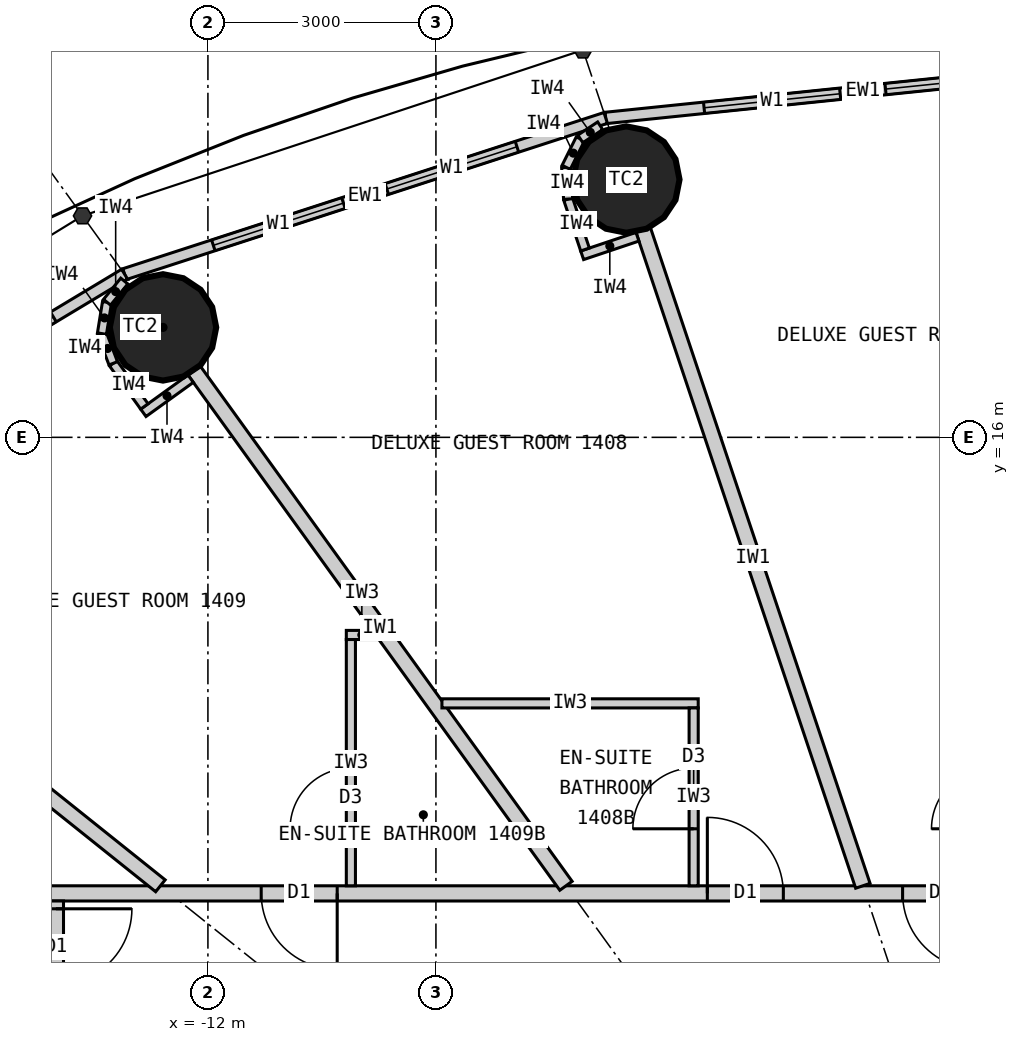
"""IFC4 building model, lengths in metres.
Left out: names, types, materials, properties, quantities, classifications, styles, units other than length and angle.
Written with IfcOpenShell. Run it as: python <this file> out.ifc"""

import sys

from ifc_helpers import new_model, si_unit, direction, frame, frame_2d, origin, origin_2d, place, context, subcontext, project, spatial, rectangle, circle, extrude, element, fill, save


model = new_model("IFC4")
c1 = context("Model", 3, precision=1e-05, world=origin(), true_north=direction((0.0, 1.0)))
c2 = subcontext(c1, "Body", "Model", "MODEL_VIEW")
j1 = project(units=[si_unit("LENGTHUNIT", "METRE"), si_unit("PLANEANGLEUNIT", "RADIAN")], contexts=[c1])
p1 = place(None, origin())
s1 = spatial("IfcSite", under=j1, at=p1, CompositionType="ELEMENT")
p2 = place(p1, origin())
s2 = spatial("IfcBuilding", under=s1, at=p2, CompositionType="ELEMENT")
p3 = place(p2, frame((0.0, 0.0, 60.6)))
s3 = spatial("IfcBuildingStorey", under=s2, at=p3, CompositionType="ELEMENT", Elevation=60.6)
for number, where, z_axis, x_axis in (
    (1, (-6.495, 19.391, 0.0), (0.0, 0.0, 1.0), (1.0, 0.0, 0.0)),
    (2, (-12.591, 17.447, 0.0), (0.0, 0.0, 1.0), (1.0, 0.0, 0.0)),
):
    element("IfcColumn", number, at=place(p3, frame(where, z_axis=z_axis, x_axis=x_axis)), inside=s3, PredefinedType="COLUMN", context=c2, shape_type="SweptSolid", body=[
        extrude(circle(Radius=0.7, at=origin_2d()), origin(), (0.0, 0.0, 1.0), 3.3),
    ])
p4 = place(p3, frame((0.0, 20.9, 0.0), z_axis=(0.0, 0.0, 1.0), x_axis=(-0.994721394369, -0.102612609291, 0.0)))
e3 = element("IfcWall", 3, at=p4, inside=s3, PredefinedType="ELEMENTEDWALL", context=c2, shape_type="SweptSolid", body=[
    extrude(rectangle(XDim=6.802, YDim=0.15, at=frame_2d((3.401, 0.0))), origin(), (0.0, 0.0, 1.0), 3.12),
])
p5 = place(p4, frame((1.301, 0.0, 0.9)))
e4 = element("IfcOpeningElement", 4, at=p5, cuts=e3, PredefinedType="OPENING", context=c2, shape_type="SweptSolid", body=[
    extrude(rectangle(XDim=1.8, YDim=1.9, at=frame_2d((0.9, 0.95))), frame((0.0, 0.085, 0.0), z_axis=(0.0, -1.0, 0.0), x_axis=(1.0, 0.0, 0.0)), (0.0, 0.0, 1.0), 0.17),
])
p6 = place(p4, frame((3.701, 0.0, 0.9)))
e5 = element("IfcOpeningElement", 5, at=p6, cuts=e3, PredefinedType="OPENING", context=c2, shape_type="SweptSolid", body=[
    extrude(rectangle(XDim=1.8, YDim=1.9, at=frame_2d((0.9, 0.95))), frame((0.0, 0.085, 0.0), z_axis=(0.0, -1.0, 0.0), x_axis=(1.0, 0.0, 0.0)), (0.0, 0.0, 1.0), 0.17),
])
p7 = place(p3, frame((-6.766, 20.202, 0.0), z_axis=(0.0, 0.0, 1.0), x_axis=(-0.951137534625, -0.308767534285, 0.0)))
e6 = element("IfcWall", 6, at=p7, inside=s3, PredefinedType="ELEMENTEDWALL", context=c2, shape_type="SweptSolid", body=[
    extrude(rectangle(XDim=6.655, YDim=0.15, at=frame_2d((3.328, 0.0))), origin(), (0.0, 0.0, 1.0), 3.12),
])
p8 = place(p7, frame((1.228, 0.0, 0.9)))
e7 = element("IfcOpeningElement", 7, at=p8, cuts=e6, PredefinedType="OPENING", context=c2, shape_type="SweptSolid", body=[
    extrude(rectangle(XDim=1.8, YDim=1.9, at=frame_2d((0.9, 0.95))), frame((0.0, 0.085, 0.0), z_axis=(0.0, -1.0, 0.0), x_axis=(1.0, 0.0, 0.0)), (0.0, 0.0, 1.0), 0.17),
])
p9 = place(p7, frame((3.628, 0.0, 0.9)))
e8 = element("IfcOpeningElement", 8, at=p9, cuts=e6, PredefinedType="OPENING", context=c2, shape_type="SweptSolid", body=[
    extrude(rectangle(XDim=1.8, YDim=1.9, at=frame_2d((0.9, 0.95))), frame((0.0, 0.085, 0.0), z_axis=(0.0, -1.0, 0.0), x_axis=(1.0, 0.0, 0.0)), (0.0, 0.0, 1.0), 0.17),
])
p10 = place(p3, frame((-13.096, 18.147, 0.0), z_axis=(0.0, 0.0, 1.0), x_axis=(-0.856983180864, -0.515344377787, 0.0)))
e9 = element("IfcWall", 9, at=p10, inside=s3, PredefinedType="ELEMENTEDWALL", context=c2, shape_type="SweptSolid", body=[
    extrude(rectangle(XDim=6.386, YDim=0.15, at=frame_2d((3.193, 0.0))), origin(), (0.0, 0.0, 1.0), 3.12),
])
p11 = place(p10, frame((1.093, 0.0, 0.9)))
e10 = element("IfcOpeningElement", 10, at=p11, cuts=e9, PredefinedType="OPENING", context=c2, shape_type="SweptSolid", body=[
    extrude(rectangle(XDim=1.8, YDim=1.9, at=frame_2d((0.9, 0.95))), frame((0.0, 0.085, 0.0), z_axis=(0.0, -1.0, 0.0), x_axis=(1.0, 0.0, 0.0)), (0.0, 0.0, 1.0), 0.17),
])
p12 = place(p10, frame((3.493, 0.0, 0.9)))
e11 = element("IfcOpeningElement", 11, at=p12, cuts=e9, PredefinedType="OPENING", context=c2, shape_type="SweptSolid", body=[
    extrude(rectangle(XDim=1.8, YDim=1.9, at=frame_2d((0.9, 0.95))), frame((0.0, 0.085, 0.0), z_axis=(0.0, -1.0, 0.0), x_axis=(1.0, 0.0, 0.0)), (0.0, 0.0, 1.0), 0.17),
])
p13 = place(p3, frame((-14.1, 10.0, 0.0), z_axis=(0.0, 0.0, 1.0), x_axis=(1.0, 0.0, 0.0)))
e12 = element("IfcWall", 12, at=p13, inside=s3, PredefinedType="PARTITIONING", context=c2, shape_type="SweptSolid", body=[
    extrude(rectangle(XDim=28.2, YDim=0.2, at=frame_2d((14.1, 0.0))), origin(), (0.0, 0.0, 1.0), 3.12),
])
p14 = place(p13, frame((18.529, 0.0, 0.0)))
e13 = element("IfcOpeningElement", 13, at=p14, cuts=e12, PredefinedType="OPENING", context=c2, shape_type="SweptSolid", body=[
    extrude(rectangle(XDim=1.0, YDim=2.2, at=frame_2d((0.5, 1.1))), frame((0.0, 0.11, 0.0), z_axis=(0.0, -1.0, 0.0), x_axis=(1.0, 0.0, 0.0)), (0.0, 0.0, 1.0), 0.22),
])
p15 = place(p13, frame((14.623, 0.0, 0.0)))
e14 = element("IfcOpeningElement", 14, at=p15, cuts=e12, PredefinedType="OPENING", context=c2, shape_type="SweptSolid", body=[
    extrude(rectangle(XDim=1.0, YDim=2.2, at=frame_2d((0.5, 1.1))), frame((0.0, 0.11, 0.0), z_axis=(0.0, -1.0, 0.0), x_axis=(1.0, 0.0, 0.0)), (0.0, 0.0, 1.0), 0.22),
])
p16 = place(p13, frame((11.24, 0.0, 0.0)))
e15 = element("IfcOpeningElement", 15, at=p16, cuts=e12, PredefinedType="OPENING", context=c2, shape_type="SweptSolid", body=[
    extrude(rectangle(XDim=1.0, YDim=2.2, at=frame_2d((0.5, 1.1))), frame((0.0, 0.11, 0.0), z_axis=(0.0, -1.0, 0.0), x_axis=(1.0, 0.0, 0.0)), (0.0, 0.0, 1.0), 0.22),
])
p17 = place(p13, frame((8.671, 0.0, 0.0)))
e16 = element("IfcOpeningElement", 16, at=p17, cuts=e12, PredefinedType="OPENING", context=c2, shape_type="SweptSolid", body=[
    extrude(rectangle(XDim=1.0, YDim=2.2, at=frame_2d((0.5, 1.1))), frame((0.0, 0.11, 0.0), z_axis=(0.0, -1.0, 0.0), x_axis=(1.0, 0.0, 0.0)), (0.0, 0.0, 1.0), 0.22),
])
p18 = place(p13, frame((2.801, 0.0, 0.0)))
e17 = element("IfcOpeningElement", 17, at=p18, cuts=e12, PredefinedType="OPENING", context=c2, shape_type="SweptSolid", body=[
    extrude(rectangle(XDim=1.0, YDim=2.2, at=frame_2d((0.5, 1.1))), frame((0.0, 0.11, 0.0), z_axis=(0.0, -1.0, 0.0), x_axis=(1.0, 0.0, 0.0)), (0.0, 0.0, 1.0), 0.22),
])
p19 = place(p3, frame((-14.0, 9.9, 0.0), z_axis=(0.0, 0.0, 1.0), x_axis=(0.0, -1.0, 0.0)))
e18 = element("IfcWall", 18, at=p19, inside=s3, PredefinedType="PARTITIONING", context=c2, shape_type="SweptSolid", body=[
    extrude(rectangle(XDim=19.8, YDim=0.2, at=frame_2d((9.9, 0.0))), origin(), (0.0, 0.0, 1.0), 3.12),
])
p20 = place(p19, frame((0.103, 0.0, 0.0)))
e19 = element("IfcOpeningElement", 19, at=p20, cuts=e18, PredefinedType="OPENING", context=c2, shape_type="SweptSolid", body=[
    extrude(rectangle(XDim=1.0, YDim=2.2, at=frame_2d((0.5, 1.1))), frame((0.0, 0.11, 0.0), z_axis=(0.0, -1.0, 0.0), x_axis=(1.0, 0.0, 0.0)), (0.0, 0.0, 1.0), 0.22),
])
p21 = place(p19, frame((5.248, 0.0, 0.0)))
e20 = element("IfcOpeningElement", 20, at=p21, cuts=e18, PredefinedType="OPENING", context=c2, shape_type="SweptSolid", body=[
    extrude(rectangle(XDim=1.0, YDim=2.2, at=frame_2d((0.5, 1.1))), frame((0.0, 0.11, 0.0), z_axis=(0.0, -1.0, 0.0), x_axis=(1.0, 0.0, 0.0)), (0.0, 0.0, 1.0), 0.22),
])
p22 = place(p19, frame((9.438, 0.0, 0.0)))
e21 = element("IfcOpeningElement", 21, at=p22, cuts=e18, PredefinedType="OPENING", context=c2, shape_type="SweptSolid", body=[
    extrude(rectangle(XDim=1.0, YDim=2.2, at=frame_2d((0.5, 1.1))), frame((0.0, 0.11, 0.0), z_axis=(0.0, -1.0, 0.0), x_axis=(1.0, 0.0, 0.0)), (0.0, 0.0, 1.0), 0.22),
])
p23 = place(p19, frame((13.942, 0.0, 0.0)))
e22 = element("IfcOpeningElement", 22, at=p23, cuts=e18, PredefinedType="OPENING", context=c2, shape_type="SweptSolid", body=[
    extrude(rectangle(XDim=1.0, YDim=2.2, at=frame_2d((0.5, 1.1))), frame((0.0, 0.11, 0.0), z_axis=(0.0, -1.0, 0.0), x_axis=(1.0, 0.0, 0.0)), (0.0, 0.0, 1.0), 0.22),
])
p24 = place(p19, frame((18.698, 0.0, 0.0)))
e23 = element("IfcOpeningElement", 23, at=p24, cuts=e18, PredefinedType="OPENING", context=c2, shape_type="SweptSolid", body=[
    extrude(rectangle(XDim=1.0, YDim=2.2, at=frame_2d((0.5, 1.1))), frame((0.0, 0.11, 0.0), z_axis=(0.0, -1.0, 0.0), x_axis=(1.0, 0.0, 0.0)), (0.0, 0.0, 1.0), 0.22),
])
p25 = place(p3, frame((-3.383, 10.1, 0.0), z_axis=(0.0, 0.0, 1.0), x_axis=(-0.31759592231, 0.948226149256, 0.0)))
e24 = element("IfcWall", 24, at=p25, inside=s3, PredefinedType="PARTITIONING", context=c2, shape_type="SweptSolid", body=[
    extrude(rectangle(XDim=9.098, YDim=0.2, at=frame_2d((4.549, 0.0))), origin(), (0.0, 0.0, 1.0), 2.32),
])
p26 = place(p3, frame((-7.289, 10.1, 0.0), z_axis=(0.0, 0.0, 1.0), x_axis=(-0.585198353053, 0.810890182197, 0.0)))
e25 = element("IfcWall", 25, at=p26, inside=s3, PredefinedType="PARTITIONING", context=c2, shape_type="SweptSolid", body=[
    extrude(rectangle(XDim=8.36, YDim=0.2, at=frame_2d((4.18, 0.0))), origin(), (0.0, 0.0, 1.0), 2.32),
])
p27 = place(p3, frame((-12.625, 10.1, 0.0), z_axis=(0.0, 0.0, 1.0), x_axis=(-0.780892451574, 0.624665493744, 0.0)))
e26 = element("IfcWall", 26, at=p27, inside=s3, PredefinedType="PARTITIONING", context=c2, shape_type="SweptSolid", body=[
    extrude(rectangle(XDim=6.045, YDim=0.2, at=frame_2d((3.022, 0.0))), origin(), (0.0, 0.0, 1.0), 2.32),
])
p28 = place(p3, frame((-8.921, 12.5, 0.0), z_axis=(0.0, 0.0, 1.0), x_axis=(1.0, 0.0, 0.0)))
e27 = element("IfcWall", 27, at=p28, inside=s3, PredefinedType="PARTITIONING", context=c2, shape_type="SweptSolid", body=[
    extrude(rectangle(XDim=3.372, YDim=0.12, at=frame_2d((1.686, 0.0))), origin(), (0.0, 0.0, 1.0), 3.12),
])
p29 = place(p3, frame((-5.609, 10.1, 0.0), z_axis=(0.0, 0.0, 1.0), x_axis=(0.0, 1.0, 0.0)))
e28 = element("IfcWall", 28, at=p29, inside=s3, PredefinedType="PARTITIONING", context=c2, shape_type="SweptSolid", body=[
    extrude(rectangle(XDim=2.34, YDim=0.12, at=frame_2d((1.17, 0.0))), origin(), (0.0, 0.0, 1.0), 3.12),
])
p30 = place(p29, frame((0.75, 0.0, 0.0)))
e29 = element("IfcOpeningElement", 29, at=p30, cuts=e28, PredefinedType="OPENING", context=c2, shape_type="SweptSolid", body=[
    extrude(rectangle(XDim=0.8, YDim=2.1, at=frame_2d((0.4, 1.05))), frame((0.0, 0.07, 0.0), z_axis=(0.0, -1.0, 0.0), x_axis=(1.0, 0.0, 0.0)), (0.0, 0.0, 1.0), 0.14),
])
p31 = place(p3, frame((-9.771, 13.4, 0.0), z_axis=(0.0, 0.0, 1.0), x_axis=(-1.0, 0.0, 0.0)))
e30 = element("IfcWall", 30, at=p31, inside=s3, PredefinedType="PARTITIONING", context=c2, shape_type="SweptSolid", body=[
    extrude(rectangle(XDim=0.408, YDim=0.12, at=frame_2d((0.204, 0.0))), origin(), (0.0, 0.0, 1.0), 3.12),
])
p32 = place(p3, frame((-10.119, 10.1, 0.0), z_axis=(0.0, 0.0, 1.0), x_axis=(0.0, 1.0, 0.0)))
e31 = element("IfcWall", 31, at=p32, inside=s3, PredefinedType="PARTITIONING", context=c2, shape_type="SweptSolid", body=[
    extrude(rectangle(XDim=3.24, YDim=0.12, at=frame_2d((1.62, 0.0))), origin(), (0.0, 0.0, 1.0), 3.12),
])
p33 = place(p32, frame((0.75, 0.0, 0.0)))
e32 = element("IfcOpeningElement", 32, at=p33, cuts=e31, PredefinedType="OPENING", context=c2, shape_type="SweptSolid", body=[
    extrude(rectangle(XDim=0.8, YDim=2.1, at=frame_2d((0.4, 1.05))), frame((0.0, 0.07, 0.0), z_axis=(0.0, -1.0, 0.0), x_axis=(1.0, 0.0, 0.0)), (0.0, 0.0, 1.0), 0.14),
])
p34 = place(p3, frame((-6.348, 18.639, 0.0), z_axis=(0.0, 0.0, 1.0), x_axis=(-0.948268951266, -0.317468102437, 0.0)))
e33 = element("IfcWall", 33, at=p34, inside=s3, PredefinedType="PARTITIONING", context=c2, shape_type="SweptSolid", body=[
    extrude(rectangle(XDim=0.768, YDim=0.12, at=frame_2d((0.384, 0.0))), origin(), (0.0, 0.0, 1.0), 3.12),
])
p35 = place(p3, frame((-7.038, 18.471, 0.0), z_axis=(0.0, 0.0, 1.0), x_axis=(-0.317378466199, 0.9482989556, 0.0)))
e34 = element("IfcWall", 34, at=p35, inside=s3, PredefinedType="PARTITIONING", context=c2, shape_type="SweptSolid", body=[
    extrude(rectangle(XDim=0.7, YDim=0.12, at=frame_2d((0.35, 0.0))), origin(), (0.0, 0.0, 1.0), 3.12),
])
p36 = place(p3, frame((-7.26, 19.135, 0.0), z_axis=(0.0, 0.0, 1.0), x_axis=(-0.0613238046, 0.99811792439, 0.0)))
e35 = element("IfcWall", 35, at=p36, inside=s3, PredefinedType="PARTITIONING", context=c2, shape_type="SweptSolid", body=[
    extrude(rectangle(XDim=0.418, YDim=0.12, at=frame_2d((0.209, 0.0))), origin(), (0.0, 0.0, 1.0), 3.12),
])
p37 = place(p3, frame((-7.286, 19.552, 0.0), z_axis=(0.0, 0.0, 1.0), x_axis=(0.445810757773, 0.89512723579, 0.0)))
e36 = element("IfcWall", 36, at=p37, inside=s3, PredefinedType="PARTITIONING", context=c2, shape_type="SweptSolid", body=[
    extrude(rectangle(XDim=0.418, YDim=0.12, at=frame_2d((0.209, 0.0))), origin(), (0.0, 0.0, 1.0), 3.12),
])
p38 = place(p3, frame((-7.1, 19.926, 0.0), z_axis=(0.0, 0.0, 1.0), x_axis=(0.833488262509, 0.552537162787, 0.0)))
e37 = element("IfcWall", 37, at=p38, inside=s3, PredefinedType="PARTITIONING", context=c2, shape_type="SweptSolid", body=[
    extrude(rectangle(XDim=0.313, YDim=0.12, at=frame_2d((0.156, 0.0))), origin(), (0.0, 0.0, 1.0), 3.12),
])
p39 = place(p3, frame((-12.227, 16.772, 0.0), z_axis=(0.0, 0.0, 1.0), x_axis=(-0.810821798253, -0.585293098778, 0.0)))
e38 = element("IfcWall", 38, at=p39, inside=s3, PredefinedType="PARTITIONING", context=c2, shape_type="SweptSolid", body=[
    extrude(rectangle(XDim=0.768, YDim=0.12, at=frame_2d((0.384, 0.0))), origin(), (0.0, 0.0, 1.0), 3.12),
])
p40 = place(p3, frame((-12.836, 16.406, 0.0), z_axis=(0.0, 0.0, 1.0), x_axis=(-0.585223113993, 0.810872312296, 0.0)))
e39 = element("IfcWall", 39, at=p40, inside=s3, PredefinedType="PARTITIONING", context=c2, shape_type="SweptSolid", body=[
    extrude(rectangle(XDim=0.7, YDim=0.12, at=frame_2d((0.35, 0.0))), origin(), (0.0, 0.0, 1.0), 3.12),
])
p41 = place(p3, frame((-13.246, 16.974, 0.0), z_axis=(0.0, 0.0, 1.0), x_axis=(-0.355728122235, 0.934589483705, 0.0)))
e40 = element("IfcWall", 40, at=p41, inside=s3, PredefinedType="PARTITIONING", context=c2, shape_type="SweptSolid", body=[
    extrude(rectangle(XDim=0.418, YDim=0.12, at=frame_2d((0.209, 0.0))), origin(), (0.0, 0.0, 1.0), 3.12),
])
p42 = place(p3, frame((-13.394, 17.365, 0.0), z_axis=(0.0, 0.0, 1.0), x_axis=(0.159379276926, 0.987217425943, 0.0)))
e41 = element("IfcWall", 41, at=p42, inside=s3, PredefinedType="PARTITIONING", context=c2, shape_type="SweptSolid", body=[
    extrude(rectangle(XDim=0.418, YDim=0.12, at=frame_2d((0.209, 0.0))), origin(), (0.0, 0.0, 1.0), 3.12),
])
p43 = place(p3, frame((-13.328, 17.777, 0.0), z_axis=(0.0, 0.0, 1.0), x_axis=(0.632276783541, 0.774742582407, 0.0)))
e42 = element("IfcWall", 42, at=p43, inside=s3, PredefinedType="PARTITIONING", context=c2, shape_type="SweptSolid", body=[
    extrude(rectangle(XDim=0.36, YDim=0.12, at=frame_2d((0.18, 0.0))), origin(), (0.0, 0.0, 1.0), 3.12),
])
p44 = place(p5, origin())
e43 = element("IfcWindow", 43, at=p44, inside=s3, PartitioningType="SINGLE_PANEL", PredefinedType="WINDOW", context=c2, shape_type="SweptSolid", body=[
    extrude(rectangle(XDim=1.8, YDim=1.9, at=frame_2d((0.9, 0.95))), frame((0.0, 0.03, 0.0), z_axis=(0.0, -1.0, 0.0), x_axis=(1.0, 0.0, 0.0)), (0.0, 0.0, 1.0), 0.06),
])
fill(e4, e43)
p45 = place(p6, origin())
e44 = element("IfcWindow", 44, at=p45, inside=s3, PartitioningType="SINGLE_PANEL", PredefinedType="WINDOW", context=c2, shape_type="SweptSolid", body=[
    extrude(rectangle(XDim=1.8, YDim=1.9, at=frame_2d((0.9, 0.95))), frame((0.0, 0.03, 0.0), z_axis=(0.0, -1.0, 0.0), x_axis=(1.0, 0.0, 0.0)), (0.0, 0.0, 1.0), 0.06),
])
fill(e5, e44)
p46 = place(p8, origin())
e45 = element("IfcWindow", 45, at=p46, inside=s3, PartitioningType="SINGLE_PANEL", PredefinedType="WINDOW", context=c2, shape_type="SweptSolid", body=[
    extrude(rectangle(XDim=1.8, YDim=1.9, at=frame_2d((0.9, 0.95))), frame((0.0, 0.03, 0.0), z_axis=(0.0, -1.0, 0.0), x_axis=(1.0, 0.0, 0.0)), (0.0, 0.0, 1.0), 0.06),
])
fill(e7, e45)
p47 = place(p9, origin())
e46 = element("IfcWindow", 46, at=p47, inside=s3, PartitioningType="SINGLE_PANEL", PredefinedType="WINDOW", context=c2, shape_type="SweptSolid", body=[
    extrude(rectangle(XDim=1.8, YDim=1.9, at=frame_2d((0.9, 0.95))), frame((0.0, 0.03, 0.0), z_axis=(0.0, -1.0, 0.0), x_axis=(1.0, 0.0, 0.0)), (0.0, 0.0, 1.0), 0.06),
])
fill(e8, e46)
p48 = place(p11, origin())
e47 = element("IfcWindow", 47, at=p48, inside=s3, PartitioningType="SINGLE_PANEL", PredefinedType="WINDOW", context=c2, shape_type="SweptSolid", body=[
    extrude(rectangle(XDim=1.8, YDim=1.9, at=frame_2d((0.9, 0.95))), frame((0.0, 0.03, 0.0), z_axis=(0.0, -1.0, 0.0), x_axis=(1.0, 0.0, 0.0)), (0.0, 0.0, 1.0), 0.06),
])
fill(e10, e47)
p49 = place(p16, origin())
e48 = element("IfcDoor", 48, at=p49, inside=s3, OperationType="SINGLE_SWING_RIGHT", PredefinedType="DOOR", context=c2, shape_type="SweptSolid", body=[
    extrude(rectangle(XDim=1.0, YDim=2.2, at=frame_2d((0.5, 1.1))), frame((0.0, 0.025, 0.0), z_axis=(0.0, -1.0, 0.0), x_axis=(1.0, 0.0, 0.0)), (0.0, 0.0, 1.0), 0.05),
])
fill(e15, e48)
p50 = place(p30, origin())
e49 = element("IfcDoor", 49, at=p50, inside=s3, OperationType="SINGLE_SWING_LEFT", PredefinedType="DOOR", context=c2, shape_type="SweptSolid", body=[
    extrude(rectangle(XDim=0.8, YDim=2.1, at=frame_2d((0.4, 1.05))), frame((0.0, 0.025, 0.0), z_axis=(0.0, -1.0, 0.0), x_axis=(1.0, 0.0, 0.0)), (0.0, 0.0, 1.0), 0.05),
])
fill(e29, e49)
p51 = place(p17, origin())
e50 = element("IfcDoor", 50, at=p51, inside=s3, OperationType="SINGLE_SWING_LEFT", PredefinedType="DOOR", context=c2, shape_type="SweptSolid", body=[
    extrude(rectangle(XDim=1.0, YDim=2.2, at=frame_2d((0.5, 1.1))), frame((0.0, 0.025, 0.0), z_axis=(0.0, -1.0, 0.0), x_axis=(1.0, 0.0, 0.0)), (0.0, 0.0, 1.0), 0.05),
])
fill(e16, e50)
p52 = place(p33, origin())
e51 = element("IfcDoor", 51, at=p52, inside=s3, OperationType="SINGLE_SWING_LEFT", PredefinedType="DOOR", context=c2, shape_type="SweptSolid", body=[
    extrude(rectangle(XDim=0.8, YDim=2.1, at=frame_2d((0.4, 1.05))), frame((0.0, 0.025, 0.0), z_axis=(0.0, -1.0, 0.0), x_axis=(1.0, 0.0, 0.0)), (0.0, 0.0, 1.0), 0.05),
])
fill(e32, e51)
p53 = place(p18, origin())
e52 = element("IfcDoor", 52, at=p53, inside=s3, OperationType="SINGLE_SWING_RIGHT", PredefinedType="DOOR", context=c2, shape_type="SweptSolid", body=[
    extrude(rectangle(XDim=1.0, YDim=2.2, at=frame_2d((0.5, 1.1))), frame((0.0, 0.025, 0.0), z_axis=(0.0, -1.0, 0.0), x_axis=(1.0, 0.0, 0.0)), (0.0, 0.0, 1.0), 0.05),
])
fill(e17, e52)
p54 = place(p20, origin())
e53 = element("IfcDoor", 53, at=p54, inside=s3, OperationType="SINGLE_SWING_LEFT", PredefinedType="DOOR", context=c2, shape_type="SweptSolid", body=[
    extrude(rectangle(XDim=1.0, YDim=2.2, at=frame_2d((0.5, 1.1))), frame((0.0, 0.025, 0.0), z_axis=(0.0, -1.0, 0.0), x_axis=(1.0, 0.0, 0.0)), (0.0, 0.0, 1.0), 0.05),
])
fill(e19, e53)
save(model, sys.argv[1])
